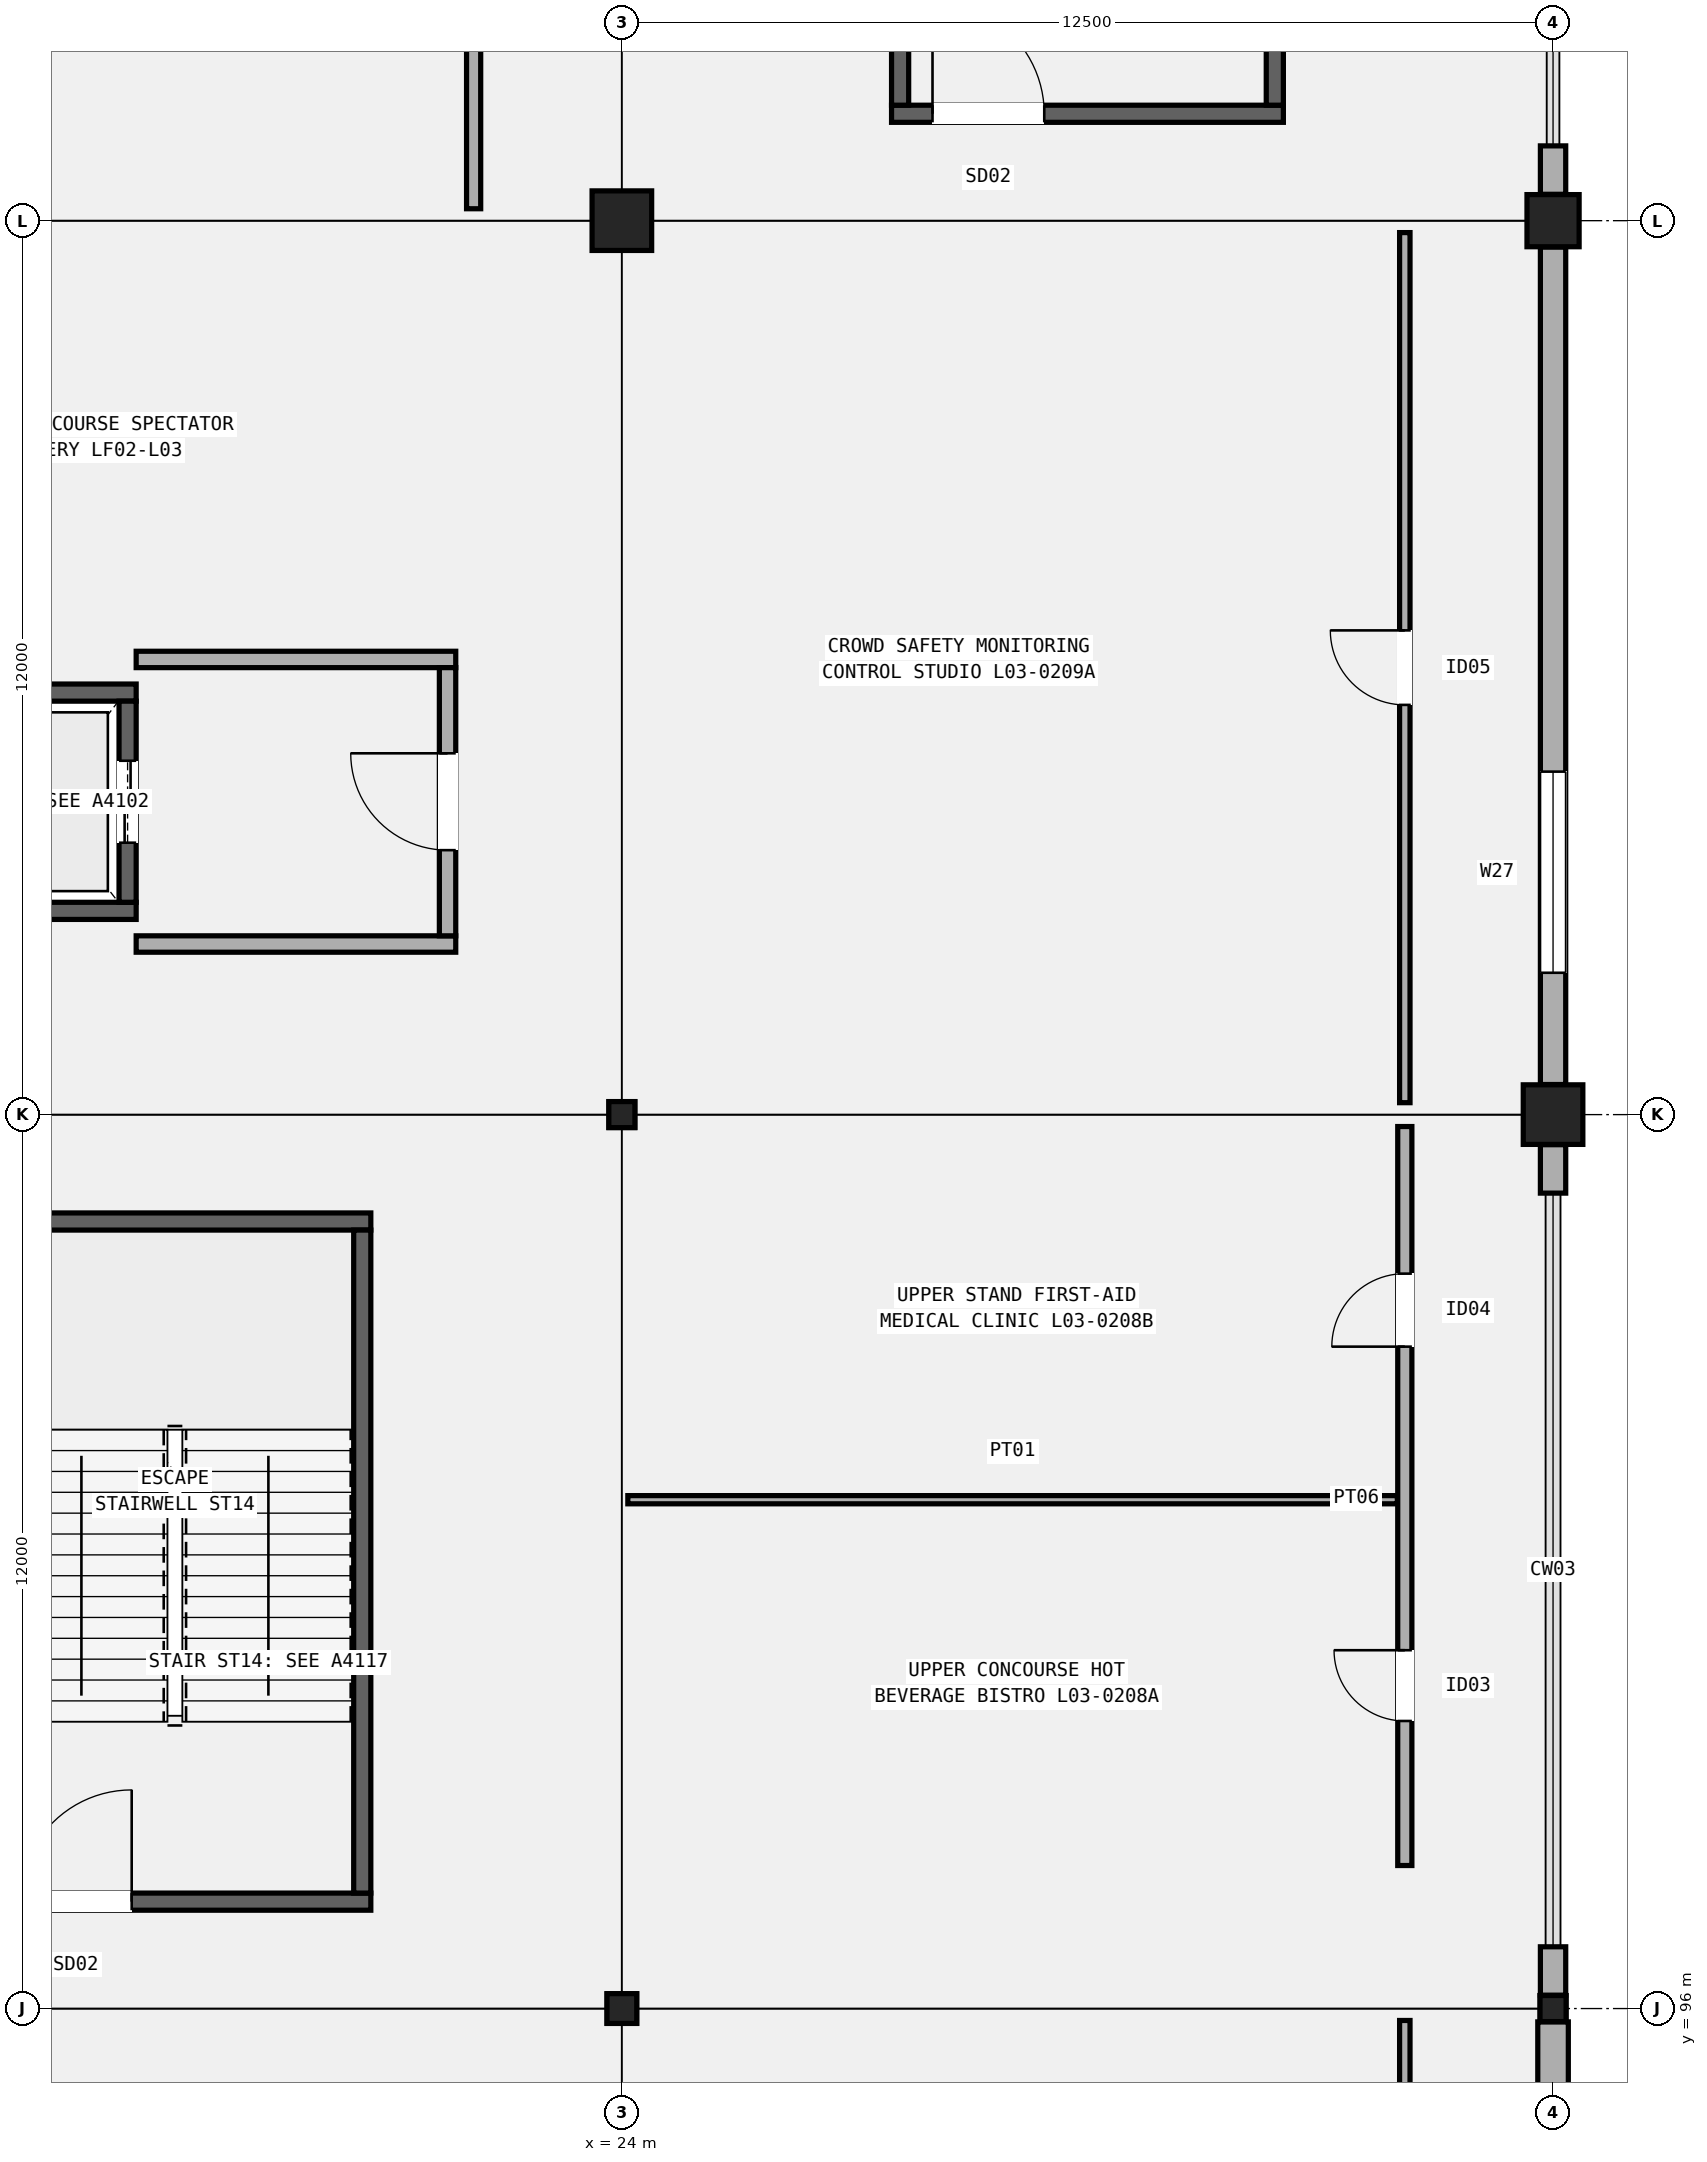
"""IFC4 building model, lengths in metres.
Left out: names, types, materials, properties, quantities, classifications, styles, units other than length and angle.
Written with IfcOpenShell. Run it as: python <this file> out.ifc"""

import sys

from ifc_helpers import new_model, si_unit, direction, frame, frame_2d, origin, origin_2d, place, context, subcontext, project, spatial, rectangle, hollow_rectangle, extrude, element, fill, save


model = new_model("IFC4")
c1 = context("Model", 3, precision=1e-05, world=origin(), true_north=direction((0.0, 1.0)))
c2 = subcontext(c1, "Body", "Model", "MODEL_VIEW")
j1 = project(units=[si_unit("LENGTHUNIT", "METRE"), si_unit("PLANEANGLEUNIT", "RADIAN")], contexts=[c1])
p1 = place(None, origin())
s1 = spatial("IfcSite", under=j1, at=p1, CompositionType="ELEMENT")
p2 = place(p1, origin())
s2 = spatial("IfcBuilding", under=s1, at=p2, CompositionType="ELEMENT")
p3 = place(p2, frame((0.0, 0.0, 15.3)))
s3 = spatial("IfcBuildingStorey", under=s2, at=p3, CompositionType="ELEMENT", Elevation=15.3)
p4 = place(p3, frame((24.0, 96.0, 0.0), z_axis=(0.0, 0.0, 1.0), x_axis=(1.0, 0.0, 0.0)))
e1 = element("IfcColumn", 1, at=p4, inside=s3, PredefinedType="COLUMN", context=c2, shape_type="SweptSolid", body=[
    extrude(hollow_rectangle(XDim=0.4, YDim=0.4, WallThickness=0.016, InnerFilletRadius=0.016, OuterFilletRadius=0.032, at=origin_2d()), origin(), (0.0, 0.0, 1.0), 5.1),
])
p5 = place(p3, frame((24.0, 108.0, 0.0), z_axis=(0.0, 0.0, 1.0), x_axis=(1.0, 0.0, 0.0)))
e2 = element("IfcColumn", 2, at=p5, inside=s3, PredefinedType="COLUMN", context=c2, shape_type="SweptSolid", body=[
    extrude(hollow_rectangle(XDim=0.35, YDim=0.35, WallThickness=0.016, InnerFilletRadius=0.016, OuterFilletRadius=0.032, at=origin_2d()), origin(), (0.0, 0.0, 1.0), 5.1),
])
p6 = place(p3, frame((24.0, 120.0, 0.0), z_axis=(0.0, 0.0, 1.0), x_axis=(1.0, 0.0, 0.0)))
e3 = element("IfcColumn", 3, at=p6, inside=s3, PredefinedType="COLUMN", context=c2, shape_type="SweptSolid", body=[
    extrude(rectangle(XDim=0.8, YDim=0.8, at=origin_2d()), origin(), (0.0, 0.0, 1.0), 5.1),
])
p7 = place(p3, frame((36.5, 96.0, 0.0), z_axis=(0.0, 0.0, 1.0), x_axis=(1.0, 0.0, 0.0)))
e4 = element("IfcColumn", 4, at=p7, inside=s3, PredefinedType="COLUMN", context=c2, shape_type="SweptSolid", body=[
    extrude(hollow_rectangle(XDim=0.35, YDim=0.35, WallThickness=0.016, InnerFilletRadius=0.016, OuterFilletRadius=0.032, at=origin_2d()), origin(), (0.0, 0.0, 1.0), 5.1),
])
p8 = place(p3, frame((36.5, 108.0, 0.0), z_axis=(0.0, 0.0, 1.0), x_axis=(1.0, 0.0, 0.0)))
e5 = element("IfcColumn", 5, at=p8, inside=s3, PredefinedType="COLUMN", context=c2, shape_type="SweptSolid", body=[
    extrude(rectangle(XDim=0.8, YDim=0.8, at=origin_2d()), origin(), (0.0, 0.0, 1.0), 5.1),
])
p9 = place(p3, frame((36.5, 120.0, 0.0), z_axis=(0.0, 0.0, 1.0), x_axis=(1.0, 0.0, 0.0)))
e6 = element("IfcColumn", 6, at=p9, inside=s3, PredefinedType="COLUMN", context=c2, shape_type="SweptSolid", body=[
    extrude(rectangle(XDim=0.7, YDim=0.7, at=origin_2d()), origin(), (0.0, 0.0, 1.0), 5.1),
])
p10 = place(p3, frame((36.5, 84.204, 0.0), z_axis=(0.0, 0.0, 1.0), x_axis=(0.0, 1.0, 0.0)))
e7 = element("IfcWall", 7, at=p10, inside=s3, PredefinedType="SOLIDWALL", context=c2, shape_type="SweptSolid", body=[
    extrude(rectangle(XDim=11.617, YDim=0.41, at=frame_2d((5.809, 0.0))), origin(), (0.0, 0.0, 1.0), 4.16),
])
p11 = place(p10, frame((1.5, 0.0, 0.95)))
e8 = element("IfcOpeningElement", 8, at=p11, cuts=e7, PredefinedType="OPENING", context=c2, shape_type="SweptSolid", body=[
    extrude(rectangle(XDim=2.55, YDim=1.95, at=frame_2d((1.275, 0.975))), frame((0.0, 0.215, 0.0), z_axis=(0.0, -1.0, 0.0), x_axis=(1.0, 0.0, 0.0)), (0.0, 0.0, 1.0), 0.43),
])
p12 = place(p3, frame((36.5, 96.179, 0.0), z_axis=(0.0, 0.0, 1.0), x_axis=(0.0, 1.0, 0.0)))
e9 = element("IfcWall", 9, at=p12, inside=s3, PredefinedType="SOLIDWALL", context=c2, shape_type="SweptSolid", body=[
    extrude(rectangle(XDim=0.65, YDim=0.34, at=frame_2d((0.325, 0.0))), origin(), (0.0, 0.0, 1.0), 4.172),
])
p13 = place(p3, frame((36.5, 106.946, 0.0), z_axis=(0.0, 0.0, 1.0), x_axis=(0.0, 1.0, 0.0)))
e10 = element("IfcWall", 10, at=p13, inside=s3, PredefinedType="SOLIDWALL", context=c2, shape_type="SweptSolid", body=[
    extrude(rectangle(XDim=0.65, YDim=0.34, at=frame_2d((0.325, 0.0))), origin(), (0.0, 0.0, 1.0), 4.172),
])
p14 = place(p3, frame((36.5, 108.404, 0.0), z_axis=(0.0, 0.0, 1.0), x_axis=(0.0, 1.0, 0.0)))
e11 = element("IfcWall", 11, at=p14, inside=s3, PredefinedType="SOLIDWALL", context=c2, shape_type="SweptSolid", body=[
    extrude(rectangle(XDim=11.242, YDim=0.34, at=frame_2d((5.621, 0.0))), origin(), (0.0, 0.0, 1.0), 4.06),
])
p15 = place(p14, frame((1.5, 0.0, 0.95)))
e12 = element("IfcOpeningElement", 12, at=p15, cuts=e11, PredefinedType="OPENING", context=c2, shape_type="SweptSolid", body=[
    extrude(rectangle(XDim=2.7, YDim=1.75, at=frame_2d((1.35, 0.875))), frame((0.0, 0.18, 0.0), z_axis=(0.0, -1.0, 0.0), x_axis=(1.0, 0.0, 0.0)), (0.0, 0.0, 1.0), 0.36),
])
p16 = place(p3, frame((36.5, 120.354, 0.0), z_axis=(0.0, 0.0, 1.0), x_axis=(0.0, 1.0, 0.0)))
e13 = element("IfcWall", 13, at=p16, inside=s3, PredefinedType="SOLIDWALL", context=c2, shape_type="SweptSolid", body=[
    extrude(rectangle(XDim=0.65, YDim=0.34, at=frame_2d((0.325, 0.0))), origin(), (0.0, 0.0, 1.0), 4.16),
])
p17 = place(p3, frame((15.37, 97.435, 0.0), z_axis=(0.0, 0.0, 1.0), x_axis=(1.0, 0.0, 0.0)))
e14 = element("IfcWall", 14, at=p17, inside=s3, PredefinedType="SHEAR", context=c2, shape_type="SweptSolid", body=[
    extrude(rectangle(XDim=5.26, YDim=0.23, at=frame_2d((2.63, 0.0))), origin(), (0.0, 0.0, 1.0), 4.86),
])
p18 = place(p17, frame((0.55, 0.0, 0.0)))
e15 = element("IfcOpeningElement", 15, at=p18, cuts=e14, PredefinedType="OPENING", context=c2, shape_type="SweptSolid", body=[
    extrude(rectangle(XDim=1.5, YDim=2.2, at=frame_2d((0.75, 1.1))), frame((0.0, 0.125, 0.0), z_axis=(0.0, -1.0, 0.0), x_axis=(1.0, 0.0, 0.0)), (0.0, 0.0, 1.0), 0.25),
])
p19 = place(p3, frame((15.37, 106.565, 0.0), z_axis=(0.0, 0.0, 1.0), x_axis=(1.0, 0.0, 0.0)))
e16 = element("IfcWall", 16, at=p19, inside=s3, PredefinedType="SHEAR", context=c2, shape_type="SweptSolid", body=[
    extrude(rectangle(XDim=5.26, YDim=0.23, at=frame_2d((2.63, 0.0))), origin(), (0.0, 0.0, 1.0), 4.86),
])
p20 = place(p3, frame((20.515, 97.55, 0.0), z_axis=(0.0, 0.0, 1.0), x_axis=(0.0, 1.0, 0.0)))
e17 = element("IfcWall", 17, at=p20, inside=s3, PredefinedType="SHEAR", context=c2, shape_type="SweptSolid", body=[
    extrude(rectangle(XDim=8.9, YDim=0.23, at=frame_2d((4.45, 0.0))), origin(), (0.0, 0.0, 1.0), 4.86),
])
p21 = place(p3, frame((27.62, 121.435, 0.0), z_axis=(0.0, 0.0, 1.0), x_axis=(1.0, 0.0, 0.0)))
e18 = element("IfcWall", 18, at=p21, inside=s3, PredefinedType="SHEAR", context=c2, shape_type="SweptSolid", body=[
    extrude(rectangle(XDim=5.26, YDim=0.23, at=frame_2d((2.63, 0.0))), origin(), (0.0, 0.0, 1.0), 4.86),
])
p22 = place(p21, frame((0.55, 0.0, 0.0)))
e19 = element("IfcOpeningElement", 19, at=p22, cuts=e18, PredefinedType="OPENING", context=c2, shape_type="SweptSolid", body=[
    extrude(rectangle(XDim=1.5, YDim=2.2, at=frame_2d((0.75, 1.1))), frame((0.0, 0.125, 0.0), z_axis=(0.0, -1.0, 0.0), x_axis=(1.0, 0.0, 0.0)), (0.0, 0.0, 1.0), 0.25),
])
for number, where, z_axis, x_axis in (
    (20, (27.735, 121.55, 0.0), (0.0, 0.0, 1.0), (0.0, 1.0, 0.0)),
    (21, (32.765, 121.55, 0.0), (0.0, 0.0, 1.0), (0.0, 1.0, 0.0)),
):
    element("IfcWall", number, at=place(p3, frame(where, z_axis=z_axis, x_axis=x_axis)), inside=s3, PredefinedType="SHEAR", context=c2, shape_type="SweptSolid", body=[
        extrude(rectangle(XDim=8.9, YDim=0.23, at=frame_2d((4.45, 0.0))), origin(), (0.0, 0.0, 1.0), 4.86),
    ])
for number, where, z_axis, x_axis in (
    (22, (14.92, 110.735, 0.0), (0.0, 0.0, 1.0), (1.0, 0.0, 0.0)),
    (23, (14.92, 113.665, 0.0), (0.0, 0.0, 1.0), (1.0, 0.0, 0.0)),
):
    element("IfcWall", number, at=place(p3, frame(where, z_axis=z_axis, x_axis=x_axis)), inside=s3, PredefinedType="SHEAR", context=c2, shape_type="SweptSolid", body=[
        extrude(rectangle(XDim=2.56, YDim=0.23, at=frame_2d((1.28, 0.0))), origin(), (0.0, 0.0, 1.0), 4.86),
    ])
p23 = place(p3, frame((17.365, 110.85, 0.0), z_axis=(0.0, 0.0, 1.0), x_axis=(0.0, 1.0, 0.0)))
e24 = element("IfcWall", 24, at=p23, inside=s3, PredefinedType="SHEAR", context=c2, shape_type="SweptSolid", body=[
    extrude(rectangle(XDim=2.7, YDim=0.23, at=frame_2d((1.35, 0.0))), origin(), (0.0, 0.0, 1.0), 4.86),
])
p24 = place(p23, frame((0.8, 0.0, 0.0)))
e25 = element("IfcOpeningElement", 25, at=p24, cuts=e24, PredefinedType="OPENING", context=c2, shape_type="SweptSolid", body=[
    extrude(rectangle(XDim=1.1, YDim=2.15, at=frame_2d((0.55, 1.075))), frame((0.0, 0.125, 0.0), z_axis=(0.0, -1.0, 0.0), x_axis=(1.0, 0.0, 0.0)), (0.0, 0.0, 1.0), 0.25),
])
for number, where, z_axis, x_axis in (
    (26, (17.48, 110.29, 0.0), (0.0, 0.0, 1.0), (1.0, 0.0, 0.0)),
    (27, (17.48, 114.11, 0.0), (0.0, 0.0, 1.0), (1.0, 0.0, 0.0)),
):
    element("IfcWall", number, at=place(p3, frame(where, z_axis=z_axis, x_axis=x_axis)), inside=s3, PredefinedType="SOLIDWALL", context=c2, shape_type="SweptSolid", body=[
        extrude(rectangle(XDim=4.29, YDim=0.22, at=frame_2d((2.145, 0.0))), origin(), (0.0, 0.0, 1.0), 4.22),
    ])
p25 = place(p3, frame((21.66, 110.4, 0.0), z_axis=(0.0, 0.0, 1.0), x_axis=(0.0, 1.0, 0.0)))
e28 = element("IfcWall", 28, at=p25, inside=s3, PredefinedType="SOLIDWALL", context=c2, shape_type="SweptSolid", body=[
    extrude(rectangle(XDim=3.6, YDim=0.22, at=frame_2d((1.8, 0.0))), origin(), (0.0, 0.0, 1.0), 4.22),
])
p26 = place(p25, frame((1.15, 0.0, 0.0)))
e29 = element("IfcOpeningElement", 29, at=p26, cuts=e28, PredefinedType="OPENING", context=c2, shape_type="SweptSolid", body=[
    extrude(rectangle(XDim=1.3, YDim=2.15, at=frame_2d((0.65, 1.075))), frame((0.0, 0.12, 0.0), z_axis=(0.0, -1.0, 0.0), x_axis=(1.0, 0.0, 0.0)), (0.0, 0.0, 1.0), 0.24),
])
p27 = place(p3, frame((22.01, 120.16, 0.0), z_axis=(0.0, 0.0, 1.0), x_axis=(0.0, 1.0, 0.0)))
e30 = element("IfcWall", 30, at=p27, inside=s3, PredefinedType="PARTITIONING", context=c2, shape_type="SweptSolid", body=[
    extrude(rectangle(XDim=11.68, YDim=0.19, at=frame_2d((5.84, 0.0))), origin(), (0.0, 0.0, 1.0), 4.22),
])
p28 = place(p27, frame((5.1, 0.0, 0.0)))
e31 = element("IfcOpeningElement", 31, at=p28, cuts=e30, PredefinedType="OPENING", context=c2, shape_type="SweptSolid", body=[
    extrude(rectangle(XDim=1.48, YDim=2.24, at=frame_2d((0.74, 1.12))), frame((0.0, 0.105, 0.0), z_axis=(0.0, -1.0, 0.0), x_axis=(1.0, 0.0, 0.0)), (0.0, 0.0, 1.0), 0.21),
])
p29 = place(p3, frame((34.51, 84.16, 0.0), z_axis=(0.0, 0.0, 1.0), x_axis=(0.0, 1.0, 0.0)))
e32 = element("IfcWall", 32, at=p29, inside=s3, PredefinedType="PARTITIONING", context=c2, shape_type="SweptSolid", body=[
    extrude(rectangle(XDim=11.68, YDim=0.14, at=frame_2d((5.84, 0.0))), origin(), (0.0, 0.0, 1.0), 4.22),
])
p30 = place(p29, frame((5.38, 0.0, 0.0)))
e33 = element("IfcOpeningElement", 33, at=p30, cuts=e32, PredefinedType="OPENING", context=c2, shape_type="SweptSolid", body=[
    extrude(rectangle(XDim=0.92, YDim=2.1, at=frame_2d((0.46, 1.05))), frame((0.0, 0.08, 0.0), z_axis=(0.0, -1.0, 0.0), x_axis=(1.0, 0.0, 0.0)), (0.0, 0.0, 1.0), 0.16),
])
p31 = place(p3, frame((34.51, 97.92, 0.0), z_axis=(0.0, 0.0, 1.0), x_axis=(0.0, 1.0, 0.0)))
e34 = element("IfcWall", 34, at=p31, inside=s3, PredefinedType="PARTITIONING", context=c2, shape_type="SweptSolid", body=[
    extrude(rectangle(XDim=9.92, YDim=0.19, at=frame_2d((4.96, 0.0))), origin(), (0.0, 0.0, 1.0), 4.22),
])
p32 = place(p31, frame((1.94, 0.0, 0.0)))
e35 = element("IfcOpeningElement", 35, at=p32, cuts=e34, PredefinedType="OPENING", context=c2, shape_type="SweptSolid", body=[
    extrude(rectangle(XDim=0.95, YDim=2.12, at=frame_2d((0.475, 1.06))), frame((0.0, 0.105, 0.0), z_axis=(0.0, -1.0, 0.0), x_axis=(1.0, 0.0, 0.0)), (0.0, 0.0, 1.0), 0.21),
])
p33 = place(p31, frame((6.965, 0.0, 0.0)))
e36 = element("IfcOpeningElement", 36, at=p33, cuts=e34, PredefinedType="OPENING", context=c2, shape_type="SweptSolid", body=[
    extrude(rectangle(XDim=0.98, YDim=2.1, at=frame_2d((0.49, 1.05))), frame((0.0, 0.105, 0.0), z_axis=(0.0, -1.0, 0.0), x_axis=(1.0, 0.0, 0.0)), (0.0, 0.0, 1.0), 0.21),
])
p34 = place(p3, frame((24.08, 102.83, 0.0), z_axis=(0.0, 0.0, 1.0), x_axis=(1.0, 0.0, 0.0)))
e37 = element("IfcWall", 37, at=p34, inside=s3, PredefinedType="PARTITIONING", context=c2, shape_type="SweptSolid", body=[
    extrude(rectangle(XDim=10.33, YDim=0.11, at=frame_2d((5.165, 0.0))), origin(), (0.0, 0.0, 1.0), 4.22),
])
p35 = place(p3, frame((34.51, 108.16, 0.0), z_axis=(0.0, 0.0, 1.0), x_axis=(0.0, 1.0, 0.0)))
e38 = element("IfcWall", 38, at=p35, inside=s3, PredefinedType="PARTITIONING", context=c2, shape_type="SweptSolid", body=[
    extrude(rectangle(XDim=11.68, YDim=0.14, at=frame_2d((5.84, 0.0))), origin(), (0.0, 0.0, 1.0), 4.22),
])
p36 = place(p35, frame((5.34, 0.0, 0.0)))
e39 = element("IfcOpeningElement", 39, at=p36, cuts=e38, PredefinedType="OPENING", context=c2, shape_type="SweptSolid", body=[
    extrude(rectangle(XDim=1.0, YDim=2.14, at=frame_2d((0.5, 1.07))), frame((0.0, 0.08, 0.0), z_axis=(0.0, -1.0, 0.0), x_axis=(1.0, 0.0, 0.0)), (0.0, 0.0, 1.0), 0.16),
])
p37 = place(p15, origin())
e40 = element("IfcWindow", 40, at=p37, inside=s3, PartitioningType="SINGLE_PANEL", PredefinedType="WINDOW", context=c2, shape_type="SweptSolid", body=[
    extrude(rectangle(XDim=2.7, YDim=1.75, at=frame_2d((1.35, 0.875))), frame((0.0, 0.03, 0.0), z_axis=(0.0, -1.0, 0.0), x_axis=(1.0, 0.0, 0.0)), (0.0, 0.0, 1.0), 0.06),
])
fill(e12, e40)
p38 = place(p18, origin())
e41 = element("IfcDoor", 41, at=p38, inside=s3, OperationType="SINGLE_SWING_RIGHT", PredefinedType="DOOR", context=c2, shape_type="SweptSolid", body=[
    extrude(rectangle(XDim=1.5, YDim=2.2, at=frame_2d((0.75, 1.1))), frame((0.0, 0.025, 0.0), z_axis=(0.0, -1.0, 0.0), x_axis=(1.0, 0.0, 0.0)), (0.0, 0.0, 1.0), 0.05),
])
fill(e15, e41)
p39 = place(p22, origin())
e42 = element("IfcDoor", 42, at=p39, inside=s3, OperationType="SINGLE_SWING_LEFT", PredefinedType="DOOR", context=c2, shape_type="SweptSolid", body=[
    extrude(rectangle(XDim=1.5, YDim=2.2, at=frame_2d((0.75, 1.1))), frame((0.0, 0.025, 0.0), z_axis=(0.0, -1.0, 0.0), x_axis=(1.0, 0.0, 0.0)), (0.0, 0.0, 1.0), 0.05),
])
fill(e19, e42)
p40 = place(p24, origin())
e43 = element("IfcDoor", 43, at=p40, inside=s3, OperationType="DOUBLE_DOOR_SLIDING", PredefinedType="DOOR", context=c2, shape_type="SweptSolid", body=[
    extrude(rectangle(XDim=1.1, YDim=2.15, at=frame_2d((0.55, 1.075))), frame((0.0, 0.025, 0.0), z_axis=(0.0, -1.0, 0.0), x_axis=(1.0, 0.0, 0.0)), (0.0, 0.0, 1.0), 0.05),
])
fill(e25, e43)
p41 = place(p26, origin())
e44 = element("IfcDoor", 44, at=p41, inside=s3, OperationType="SINGLE_SWING_RIGHT", PredefinedType="DOOR", context=c2, shape_type="SweptSolid", body=[
    extrude(rectangle(XDim=1.3, YDim=2.15, at=frame_2d((0.65, 1.075))), frame((0.0, 0.025, 0.0), z_axis=(0.0, -1.0, 0.0), x_axis=(1.0, 0.0, 0.0)), (0.0, 0.0, 1.0), 0.05),
])
fill(e29, e44)
p42 = place(p32, origin())
e45 = element("IfcDoor", 45, at=p42, inside=s3, OperationType="SINGLE_SWING_RIGHT", PredefinedType="DOOR", context=c2, shape_type="SweptSolid", body=[
    extrude(rectangle(XDim=0.95, YDim=2.12, at=frame_2d((0.475, 1.06))), frame((0.0, 0.025, 0.0), z_axis=(0.0, -1.0, 0.0), x_axis=(1.0, 0.0, 0.0)), (0.0, 0.0, 1.0), 0.05),
])
fill(e35, e45)
p43 = place(p33, origin())
e46 = element("IfcDoor", 46, at=p43, inside=s3, OperationType="SINGLE_SWING_LEFT", PredefinedType="DOOR", context=c2, shape_type="SweptSolid", body=[
    extrude(rectangle(XDim=0.98, YDim=2.1, at=frame_2d((0.49, 1.05))), frame((0.0, 0.025, 0.0), z_axis=(0.0, -1.0, 0.0), x_axis=(1.0, 0.0, 0.0)), (0.0, 0.0, 1.0), 0.05),
])
fill(e36, e46)
p44 = place(p36, origin())
e47 = element("IfcDoor", 47, at=p44, inside=s3, OperationType="SINGLE_SWING_RIGHT", PredefinedType="DOOR", context=c2, shape_type="SweptSolid", body=[
    extrude(rectangle(XDim=1.0, YDim=2.14, at=frame_2d((0.5, 1.07))), frame((0.0, 0.025, 0.0), z_axis=(0.0, -1.0, 0.0), x_axis=(1.0, 0.0, 0.0)), (0.0, 0.0, 1.0), 0.05),
])
fill(e39, e47)
save(model, sys.argv[1])
